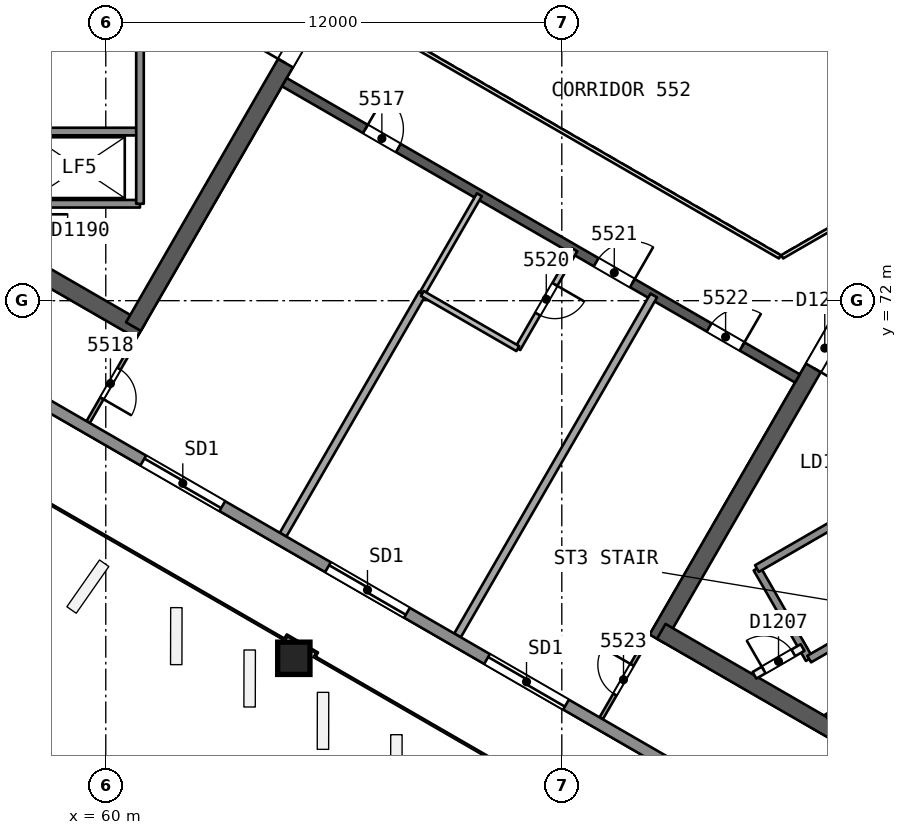
"""IFC4 building model, lengths in metres.
Left out: names, types, materials, properties, quantities, classifications, styles, units other than length and angle.
Written with IfcOpenShell. Run it as: python <this file> out.ifc"""

import sys

from ifc_helpers import new_model, si_unit, direction, frame, frame_2d, origin, origin_2d, place, context, subcontext, project, spatial, rectangle, extrude, element, fill, save


model = new_model("IFC4")
c1 = context("Model", 3, precision=1e-05, world=origin(), true_north=direction((0.0, 1.0)))
c2 = subcontext(c1, "Body", "Model", "MODEL_VIEW")
j1 = project(units=[si_unit("LENGTHUNIT", "METRE"), si_unit("PLANEANGLEUNIT", "RADIAN")], contexts=[c1])
p1 = place(None, origin())
s1 = spatial("IfcSite", under=j1, at=p1, CompositionType="ELEMENT")
p2 = place(p1, origin())
s2 = spatial("IfcBuilding", under=s1, at=p2, CompositionType="ELEMENT")
p3 = place(p2, frame((0.0, 0.0, 224.3)))
s3 = spatial("IfcBuildingStorey", under=s2, at=p3, CompositionType="ELEMENT", Elevation=224.3)
p4 = place(p3, frame((48.622, 78.307, 0.0), z_axis=(0.0, 0.0, 1.0), x_axis=(0.86602701116, -0.499997215934, 0.0)))
e1 = element("IfcWall", 1, at=p4, inside=s3, PredefinedType="SHEAR", context=c2, shape_type="SweptSolid", body=[
    extrude(rectangle(XDim=14.204, YDim=0.45, at=frame_2d((7.102, 0.0))), origin(), (0.0, 0.0, 1.0), 3.7),
])
p5 = place(p3, frame((60.728, 71.318, 0.0), z_axis=(0.0, 0.0, 1.0), x_axis=(0.500012416173, 0.866018235185, 0.0)))
e2 = element("IfcWall", 2, at=p5, inside=s3, PredefinedType="SHEAR", context=c2, shape_type="SweptSolid", body=[
    extrude(rectangle(XDim=10.155, YDim=0.45, at=frame_2d((5.078, 0.0))), origin(), (0.0, 0.0, 1.0), 3.7),
])
p6 = place(p5, frame((8.005, 0.0, 0.0)))
e3 = element("IfcOpeningElement", 3, at=p6, cuts=e2, PredefinedType="OPENING", context=c2, shape_type="SweptSolid", body=[
    extrude(rectangle(XDim=1.2, YDim=2.1, at=frame_2d((0.6, 1.05))), frame((0.0, 0.235, 0.0), z_axis=(0.0, -1.0, 0.0), x_axis=(1.0, 0.0, 0.0)), (0.0, 0.0, 1.0), 0.471),
])
p7 = place(p3, frame((79.63, 71.981, 0.0), z_axis=(0.0, 0.0, 1.0), x_axis=(-0.500002171595, -0.86602415001, 0.0)))
e4 = element("IfcWall", 4, at=p7, inside=s3, PredefinedType="SHEAR", context=c2, shape_type="SweptSolid", body=[
    extrude(rectangle(XDim=10.25, YDim=0.45, at=frame_2d((5.125, 0.0))), origin(), (0.0, 0.0, 1.0), 3.7),
])
p8 = place(p7, frame((0.82, 0.0, 0.0)))
e5 = element("IfcOpeningElement", 5, at=p8, cuts=e4, PredefinedType="OPENING", context=c2, shape_type="SweptSolid", body=[
    extrude(rectangle(XDim=1.2, YDim=2.1, at=frame_2d((0.6, 1.05))), frame((0.0, 0.235, 0.0), z_axis=(0.0, -1.0, 0.0), x_axis=(1.0, 0.0, 0.0)), (0.0, 0.0, 1.0), 0.471),
])
p9 = place(p3, frame((74.617, 63.299, 0.0), z_axis=(0.0, 0.0, 1.0), x_axis=(0.86602594008, -0.499999071108, 0.0)))
e6 = element("IfcWall", 6, at=p9, inside=s3, PredefinedType="SHEAR", context=c2, shape_type="SweptSolid", body=[
    extrude(rectangle(XDim=14.108, YDim=0.45, at=frame_2d((7.054, 0.0))), origin(), (0.0, 0.0, 1.0), 3.7),
])
p10 = place(p3, frame((64.7, 77.748, 0.0), z_axis=(0.0, 0.0, 1.0), x_axis=(0.866026492143, -0.499998114903, 0.0)))
e7 = element("IfcWall", 7, at=p10, inside=s3, PredefinedType="SHEAR", context=c2, shape_type="SweptSolid", body=[
    extrude(rectangle(XDim=15.588, YDim=0.25, at=frame_2d((7.794, 0.0))), origin(), (0.0, 0.0, 1.0), 3.3),
])
p11 = place(p10, frame((2.462, 0.0, 0.0)))
e8 = element("IfcOpeningElement", 8, at=p11, cuts=e7, PredefinedType="OPENING", context=c2, shape_type="SweptSolid", body=[
    extrude(rectangle(XDim=1.0, YDim=2.1, at=frame_2d((0.5, 1.05))), frame((0.0, 0.135, 0.0), z_axis=(0.0, -1.0, 0.0), x_axis=(1.0, 0.0, 0.0)), (0.0, 0.0, 1.0), 0.271),
])
p12 = place(p10, frame((9.474, 0.0, 0.0)))
e9 = element("IfcOpeningElement", 9, at=p12, cuts=e7, PredefinedType="OPENING", context=c2, shape_type="SweptSolid", body=[
    extrude(rectangle(XDim=1.1, YDim=2.1, at=frame_2d((0.55, 1.05))), frame((0.0, 0.135, 0.0), z_axis=(0.0, -1.0, 0.0), x_axis=(1.0, 0.0, 0.0)), (0.0, 0.0, 1.0), 0.271),
])
p13 = place(p10, frame((12.906, 0.0, 0.0)))
e10 = element("IfcOpeningElement", 10, at=p13, cuts=e7, PredefinedType="OPENING", context=c2, shape_type="SweptSolid", body=[
    extrude(rectangle(XDim=1.0, YDim=2.1, at=frame_2d((0.5, 1.05))), frame((0.0, 0.135, 0.0), z_axis=(0.0, -1.0, 0.0), x_axis=(1.0, 0.0, 0.0)), (0.0, 0.0, 1.0), 0.271),
])
p14 = place(p3, frame((64.936, 62.569, 0.0), z_axis=(0.010093620709, 0.017482414954, 0.999796221231), x_axis=(-0.499912926478, -0.865840372083, 0.020187025823)))
e11 = element("IfcColumn", 11, at=p14, inside=s3, PredefinedType="COLUMN", context=c2, shape_type="SweptSolid", body=[
    extrude(rectangle(XDim=0.85, YDim=0.85, at=origin_2d()), origin(), (0.0, 0.0, 1.0), 3.701),
])
p15 = place(p3, frame((60.71, 70.838, 0.0), z_axis=(0.0, 0.0, 1.0), x_axis=(-0.499950341091, -0.86605407247, 0.0)))
e12 = element("IfcWall", 12, at=p15, inside=s3, PredefinedType="PARTITIONING", context=c2, shape_type="SweptSolid", body=[
    extrude(rectangle(XDim=2.349, YDim=0.1, at=frame_2d((1.175, 0.0))), origin(), (0.0, 0.0, 1.0), 3.3),
])
p16 = place(p15, frame((0.725, 0.0, 0.0)))
e13 = element("IfcOpeningElement", 13, at=p16, cuts=e12, PredefinedType="OPENING", context=c2, shape_type="SweptSolid", body=[
    extrude(rectangle(XDim=0.9, YDim=2.1, at=frame_2d((0.45, 1.05))), frame((0.0, 0.061, 0.0), z_axis=(0.0, -1.0, 0.0), x_axis=(1.0, 0.0, 0.0)), (0.0, 0.0, 1.0), 0.121),
])
p17 = place(p3, frame((64.666, 65.842, 0.0), z_axis=(0.0, 0.0, 1.0), x_axis=(0.500019482754, 0.866014155119, 0.0)))
e14 = element("IfcWall", 14, at=p17, inside=s3, PredefinedType="PARTITIONING", context=c2, shape_type="SweptSolid", body=[
    extrude(rectangle(XDim=7.328, YDim=0.2, at=frame_2d((3.664, 0.0))), origin(), (0.0, 0.0, 1.0), 3.3),
])
p18 = place(p3, frame((68.33, 72.188, 0.0), z_axis=(0.0, 0.0, 1.0), x_axis=(0.499990139034, 0.866031096941, 0.0)))
e15 = element("IfcWall", 15, at=p18, inside=s3, PredefinedType="PARTITIONING", context=c2, shape_type="SweptSolid", body=[
    extrude(rectangle(XDim=3.0, YDim=0.15, at=frame_2d((1.5, 0.0))), origin(), (0.0, 0.0, 1.0), 3.3),
])
p19 = place(p3, frame((72.342, 73.336, 0.0), z_axis=(0.0, 0.0, 1.0), x_axis=(-0.50002537861, -0.866010750942, 0.0)))
e16 = element("IfcWall", 16, at=p19, inside=s3, PredefinedType="PARTITIONING", context=c2, shape_type="SweptSolid", body=[
    extrude(rectangle(XDim=3.0, YDim=0.15, at=frame_2d((1.5, 0.0))), origin(), (0.0, 0.0, 1.0), 3.3),
])
p20 = place(p19, frame((1.05, 0.0, 0.0)))
e17 = element("IfcOpeningElement", 17, at=p20, cuts=e16, PredefinedType="OPENING", context=c2, shape_type="SweptSolid", body=[
    extrude(rectangle(XDim=0.9, YDim=2.1, at=frame_2d((0.45, 1.05))), frame((0.0, 0.085, 0.0), z_axis=(0.0, -1.0, 0.0), x_axis=(1.0, 0.0, 0.0)), (0.0, 0.0, 1.0), 0.171),
])
p21 = place(p3, frame((70.842, 70.739, 0.0), z_axis=(0.0, 0.0, 1.0), x_axis=(-0.866032775405, 0.499987231761, 0.0)))
e18 = element("IfcWall", 18, at=p21, inside=s3, PredefinedType="PARTITIONING", context=c2, shape_type="SweptSolid", body=[
    extrude(rectangle(XDim=2.9, YDim=0.15, at=frame_2d((1.45, 0.0))), origin(), (0.0, 0.0, 1.0), 3.3),
])
p22 = place(p3, frame((69.256, 63.192, 0.0), z_axis=(0.0, 0.0, 1.0), x_axis=(0.499993230995, 0.866029311836, 0.0)))
e19 = element("IfcWall", 19, at=p22, inside=s3, PredefinedType="PARTITIONING", context=c2, shape_type="SweptSolid", body=[
    extrude(rectangle(XDim=10.328, YDim=0.2, at=frame_2d((5.164, 0.0))), origin(), (0.0, 0.0, 1.0), 3.3),
])
p23 = place(p3, frame((73.036, 61.01, 0.0), z_axis=(0.0, 0.0, 1.0), x_axis=(0.499950341091, 0.86605407247, 0.0)))
e20 = element("IfcWall", 20, at=p23, inside=s3, PredefinedType="PARTITIONING", context=c2, shape_type="SweptSolid", body=[
    extrude(rectangle(XDim=2.349, YDim=0.1, at=frame_2d((1.175, 0.0))), origin(), (0.0, 0.0, 1.0), 3.3),
])
p24 = place(p23, frame((0.725, 0.0, 0.0)))
e21 = element("IfcOpeningElement", 21, at=p24, cuts=e20, PredefinedType="OPENING", context=c2, shape_type="SweptSolid", body=[
    extrude(rectangle(XDim=0.9, YDim=2.1, at=frame_2d((0.45, 1.05))), frame((0.0, 0.061, 0.0), z_axis=(0.0, -1.0, 0.0), x_axis=(1.0, 0.0, 0.0)), (0.0, 0.0, 1.0), 0.121),
])
p25 = place(p3, frame((88.099, 52.141, 0.0), z_axis=(0.0, 0.0, 1.0), x_axis=(-0.86602584856, 0.499999229625, 0.0)))
e22 = element("IfcWall", 22, at=p25, inside=s3, PredefinedType="SOLIDWALL", context=c2, shape_type="SweptSolid", body=[
    extrude(rectangle(XDim=50.547, YDim=0.3, at=frame_2d((25.274, 0.0))), origin(), (0.0, 0.0, 1.0), 3.3),
])
p26 = place(p25, frame((23.294, 0.0, 0.0)))
e23 = element("IfcOpeningElement", 23, at=p26, cuts=e22, PredefinedType="OPENING", context=c2, shape_type="SweptSolid", body=[
    extrude(rectangle(XDim=2.4, YDim=2.4, at=frame_2d((1.2, 1.2))), frame((0.0, 0.161, 0.0), z_axis=(0.0, -1.0, 0.0), x_axis=(1.0, 0.0, 0.0)), (0.0, 0.0, 1.0), 0.321),
])
p27 = place(p25, frame((28.906, 0.0, 0.0)))
e24 = element("IfcOpeningElement", 24, at=p27, cuts=e22, PredefinedType="OPENING", context=c2, shape_type="SweptSolid", body=[
    extrude(rectangle(XDim=2.4, YDim=2.4, at=frame_2d((1.2, 1.2))), frame((0.0, 0.161, 0.0), z_axis=(0.0, -1.0, 0.0), x_axis=(1.0, 0.0, 0.0)), (0.0, 0.0, 1.0), 0.321),
])
p28 = place(p25, frame((39.328, 0.0, 0.0)))
e25 = element("IfcOpeningElement", 25, at=p28, cuts=e22, PredefinedType="OPENING", context=c2, shape_type="SweptSolid", body=[
    extrude(rectangle(XDim=2.4, YDim=2.4, at=frame_2d((1.2, 1.2))), frame((0.0, 0.161, 0.0), z_axis=(0.0, -1.0, 0.0), x_axis=(1.0, 0.0, 0.0)), (0.0, 0.0, 1.0), 0.321),
])
p29 = place(p25, frame((18.462, 0.0, 0.0)))
e26 = element("IfcOpeningElement", 26, at=p29, cuts=e22, PredefinedType="OPENING", context=c2, shape_type="SweptSolid", body=[
    extrude(rectangle(XDim=2.4, YDim=2.4, at=frame_2d((1.2, 1.2))), frame((0.0, 0.161, 0.0), z_axis=(0.0, -1.0, 0.0), x_axis=(1.0, 0.0, 0.0)), (0.0, 0.0, 1.0), 0.321),
])
p30 = place(p25, frame((8.771, 0.0, 0.0)))
e27 = element("IfcOpeningElement", 27, at=p30, cuts=e22, PredefinedType="OPENING", context=c2, shape_type="SweptSolid", body=[
    extrude(rectangle(XDim=2.4, YDim=2.4, at=frame_2d((1.2, 1.2))), frame((0.0, 0.161, 0.0), z_axis=(0.0, -1.0, 0.0), x_axis=(1.0, 0.0, 0.0)), (0.0, 0.0, 1.0), 0.321),
])
for number, where, z_axis, x_axis in (
    (28, (60.9, 76.45, 0.0), (0.0, 0.0, 1.0), (-1.0, 0.0, 0.0)),
    (29, (60.9, 74.55, 0.0), (0.0, 0.0, 1.0), (-1.0, 0.0, 0.0)),
):
    element("IfcWall", number, at=place(p3, frame(where, z_axis=z_axis, x_axis=x_axis)), inside=s3, PredefinedType="SOLIDWALL", context=c2, shape_type="SweptSolid", body=[
        extrude(rectangle(XDim=3.05, YDim=0.2, at=frame_2d((1.525, 0.0))), origin(), (0.0, 0.0, 1.0), 3.3),
    ])
p31 = place(p3, frame((60.9, 85.45, 0.0), z_axis=(0.0, 0.0, 1.0), x_axis=(0.0, -1.0, 0.0)))
e30 = element("IfcWall", 30, at=p31, inside=s3, PredefinedType="SOLIDWALL", context=c2, shape_type="SweptSolid", body=[
    extrude(rectangle(XDim=10.9, YDim=0.2, at=frame_2d((5.45, 0.0))), origin(), (0.0, 0.0, 1.0), 3.3),
])
p32 = place(p31, frame((4.0, 0.0, 0.0)))
e31 = element("IfcOpeningElement", 31, at=p32, cuts=e30, PredefinedType="OPENING", context=c2, shape_type="SweptSolid", body=[
    extrude(rectangle(XDim=1.0, YDim=2.1, at=frame_2d((0.5, 1.05))), frame((0.0, 0.11, 0.0), z_axis=(0.0, -1.0, 0.0), x_axis=(1.0, 0.0, 0.0)), (0.0, 0.0, 1.0), 0.221),
])
p33 = place(p3, frame((77.135, 64.952, 0.0), z_axis=(0.0, 0.0, 1.0), x_axis=(0.499996545922, -0.866027397988, 0.0)))
e32 = element("IfcWall", 32, at=p33, inside=s3, PredefinedType="SOLIDWALL", context=c2, shape_type="SweptSolid", body=[
    extrude(rectangle(XDim=2.75, YDim=0.2, at=frame_2d((1.375, 0.0))), origin(), (0.0, 0.0, 1.0), 3.3),
])
p34 = place(p3, frame((77.135, 64.952, 0.0), z_axis=(0.0, 0.0, 1.0), x_axis=(0.866031916153, 0.499988720078, 0.0)))
e33 = element("IfcWall", 33, at=p34, inside=s3, PredefinedType="SOLIDWALL", context=c2, shape_type="SweptSolid", body=[
    extrude(rectangle(XDim=11.35, YDim=0.2, at=frame_2d((5.675, 0.0))), origin(), (0.0, 0.0, 1.0), 3.3),
])
p35 = place(p34, frame((2.875, 0.0, 0.0)))
e34 = element("IfcOpeningElement", 34, at=p35, cuts=e33, PredefinedType="OPENING", context=c2, shape_type="SweptSolid", body=[
    extrude(rectangle(XDim=1.1, YDim=2.1, at=frame_2d((0.55, 1.05))), frame((0.0, 0.11, 0.0), z_axis=(0.0, -1.0, 0.0), x_axis=(1.0, 0.0, 0.0)), (0.0, 0.0, 1.0), 0.221),
])
p36 = place(p34, frame((5.125, 0.0, 0.0)))
e35 = element("IfcOpeningElement", 35, at=p36, cuts=e33, PredefinedType="OPENING", context=c2, shape_type="SweptSolid", body=[
    extrude(rectangle(XDim=1.1, YDim=2.1, at=frame_2d((0.55, 1.05))), frame((0.0, 0.11, 0.0), z_axis=(0.0, -1.0, 0.0), x_axis=(1.0, 0.0, 0.0)), (0.0, 0.0, 1.0), 0.221),
])
p37 = place(p34, frame((7.375, 0.0, 0.0)))
e36 = element("IfcOpeningElement", 36, at=p37, cuts=e33, PredefinedType="OPENING", context=c2, shape_type="SweptSolid", body=[
    extrude(rectangle(XDim=1.1, YDim=2.1, at=frame_2d((0.55, 1.05))), frame((0.0, 0.11, 0.0), z_axis=(0.0, -1.0, 0.0), x_axis=(1.0, 0.0, 0.0)), (0.0, 0.0, 1.0), 0.221),
])
p38 = place(p3, frame((77.07, 62.143, 0.0), z_axis=(0.0, 0.0, 1.0), x_axis=(0.866013036001, 0.500021421018, 0.0)))
e37 = element("IfcWall", 37, at=p38, inside=s3, PredefinedType="PARTITIONING", context=c2, shape_type="SweptSolid", body=[
    extrude(rectangle(XDim=1.461, YDim=0.2, at=frame_2d((0.73, 0.0))), origin(), (0.0, 0.0, 1.0), 3.3),
])
p39 = place(p38, frame((0.281, 0.0, 0.0)))
e38 = element("IfcOpeningElement", 38, at=p39, cuts=e37, PredefinedType="OPENING", context=c2, shape_type="SweptSolid", body=[
    extrude(rectangle(XDim=0.9, YDim=2.1, at=frame_2d((0.45, 1.05))), frame((0.0, 0.11, 0.0), z_axis=(0.0, -1.0, 0.0), x_axis=(1.0, 0.0, 0.0)), (0.0, 0.0, 1.0), 0.221),
])
p40 = place(p3, frame((78.51, 62.57, 0.0), z_axis=(0.0, 0.0, 1.0), x_axis=(0.866053019151, 0.499952165731, 0.0)))
e39 = element("IfcWall", 39, at=p40, inside=s3, PredefinedType="SOLIDWALL", context=c2, shape_type="SweptSolid", body=[
    extrude(rectangle(XDim=2.3, YDim=0.2, at=frame_2d((1.15, 0.0))), origin(), (0.0, 0.0, 1.0), 3.3),
])
p41 = place(p3, frame((78.97, 61.046, 0.0), z_axis=(0.0, 0.0, 1.0), x_axis=(0.866033475577, 0.499986018985, 0.0)))
e40 = element("IfcWall", 40, at=p41, inside=s3, PredefinedType="PARTITIONING", context=c2, shape_type="SweptSolid", body=[
    extrude(rectangle(XDim=2.539, YDim=0.15, at=frame_2d((1.27, 0.0))), origin(), (0.0, 0.0, 1.0), 3.3),
])
p42 = place(p3, frame((67.702, 78.948, 0.0), z_axis=(0.0, 0.0, 1.0), x_axis=(0.866026658274, -0.499997827154, 0.0)))
e41 = element("IfcWall", 41, at=p42, inside=s3, PredefinedType="PARTITIONING", context=c2, shape_type="SweptSolid", body=[
    extrude(rectangle(XDim=11.588, YDim=0.1, at=frame_2d((5.794, 0.0))), origin(), (0.0, 0.0, 1.0), 3.3),
])
p43 = place(p3, frame((77.798, 73.154, 0.0), z_axis=(0.0, 0.0, 1.0), x_axis=(0.866041268327, 0.499972520799, 0.0)))
e42 = element("IfcWall", 42, at=p43, inside=s3, PredefinedType="PARTITIONING", context=c2, shape_type="SweptSolid", body=[
    extrude(rectangle(XDim=2.0, YDim=0.1, at=frame_2d((1.0, 0.0))), origin(), (0.0, 0.0, 1.0), 3.3),
])
p44 = place(p11, origin())
e43 = element("IfcDoor", 43, at=p44, inside=s3, OperationType="SINGLE_SWING_LEFT", PredefinedType="NOTDEFINED", context=c2, shape_type="SweptSolid", body=[
    extrude(rectangle(XDim=1.0, YDim=2.1, at=frame_2d((0.5, 1.05))), frame((0.0, 0.025, 0.0), z_axis=(0.0, -1.0, 0.0), x_axis=(1.0, 0.0, 0.0)), (0.0, 0.0, 1.0), 0.05),
])
fill(e8, e43)
p45 = place(p16, origin())
e44 = element("IfcDoor", 44, at=p45, inside=s3, OperationType="SINGLE_SWING_RIGHT", PredefinedType="NOTDEFINED", context=c2, shape_type="SweptSolid", body=[
    extrude(rectangle(XDim=0.9, YDim=2.1, at=frame_2d((0.45, 1.05))), frame((0.0, 0.025, 0.0), z_axis=(0.0, -1.0, 0.0), x_axis=(1.0, 0.0, 0.0)), (0.0, 0.0, 1.0), 0.05),
])
fill(e13, e44)
p46 = place(p20, origin())
e45 = element("IfcDoor", 45, at=p46, inside=s3, OperationType="SINGLE_SWING_LEFT", PredefinedType="NOTDEFINED", context=c2, shape_type="SweptSolid", body=[
    extrude(rectangle(XDim=0.9, YDim=2.1, at=frame_2d((0.45, 1.05))), frame((0.0, 0.025, 0.0), z_axis=(0.0, -1.0, 0.0), x_axis=(1.0, 0.0, 0.0)), (0.0, 0.0, 1.0), 0.05),
])
fill(e17, e45)
p47 = place(p12, origin())
e46 = element("IfcDoor", 46, at=p47, inside=s3, OperationType="SINGLE_SWING_RIGHT", PredefinedType="NOTDEFINED", context=c2, shape_type="SweptSolid", body=[
    extrude(rectangle(XDim=1.1, YDim=2.1, at=frame_2d((0.55, 1.05))), frame((0.0, 0.025, 0.0), z_axis=(0.0, -1.0, 0.0), x_axis=(1.0, 0.0, 0.0)), (0.0, 0.0, 1.0), 0.05),
])
fill(e9, e46)
p48 = place(p13, origin())
e47 = element("IfcDoor", 47, at=p48, inside=s3, OperationType="SINGLE_SWING_RIGHT", PredefinedType="NOTDEFINED", context=c2, shape_type="SweptSolid", body=[
    extrude(rectangle(XDim=1.0, YDim=2.1, at=frame_2d((0.5, 1.05))), frame((0.0, 0.025, 0.0), z_axis=(0.0, -1.0, 0.0), x_axis=(1.0, 0.0, 0.0)), (0.0, 0.0, 1.0), 0.05),
])
fill(e10, e47)
p49 = place(p24, origin())
e48 = element("IfcDoor", 48, at=p49, inside=s3, OperationType="SINGLE_SWING_RIGHT", PredefinedType="NOTDEFINED", context=c2, shape_type="SweptSolid", body=[
    extrude(rectangle(XDim=0.9, YDim=2.1, at=frame_2d((0.45, 1.05))), frame((0.0, 0.025, 0.0), z_axis=(0.0, -1.0, 0.0), x_axis=(1.0, 0.0, 0.0)), (0.0, 0.0, 1.0), 0.05),
])
fill(e21, e48)
p50 = place(p26, origin())
e49 = element("IfcDoor", 49, at=p50, inside=s3, OperationType="SLIDING_TO_LEFT", PredefinedType="NOTDEFINED", context=c2, shape_type="SweptSolid", body=[
    extrude(rectangle(XDim=2.4, YDim=2.4, at=frame_2d((1.2, 1.2))), frame((0.0, 0.025, 0.0), z_axis=(0.0, -1.0, 0.0), x_axis=(1.0, 0.0, 0.0)), (0.0, 0.0, 1.0), 0.05),
])
fill(e23, e49)
p51 = place(p27, origin())
e50 = element("IfcDoor", 50, at=p51, inside=s3, OperationType="SLIDING_TO_RIGHT", PredefinedType="NOTDEFINED", context=c2, shape_type="SweptSolid", body=[
    extrude(rectangle(XDim=2.4, YDim=2.4, at=frame_2d((1.2, 1.2))), frame((0.0, 0.025, 0.0), z_axis=(0.0, -1.0, 0.0), x_axis=(1.0, 0.0, 0.0)), (0.0, 0.0, 1.0), 0.05),
])
fill(e24, e50)
p52 = place(p29, origin())
e51 = element("IfcDoor", 51, at=p52, inside=s3, OperationType="SLIDING_TO_RIGHT", PredefinedType="NOTDEFINED", context=c2, shape_type="SweptSolid", body=[
    extrude(rectangle(XDim=2.4, YDim=2.4, at=frame_2d((1.2, 1.2))), frame((0.0, 0.025, 0.0), z_axis=(0.0, -1.0, 0.0), x_axis=(1.0, 0.0, 0.0)), (0.0, 0.0, 1.0), 0.05),
])
fill(e26, e51)
p53 = place(p6, origin())
e52 = element("IfcDoor", 52, at=p53, inside=s3, OperationType="SINGLE_SWING_LEFT", PredefinedType="NOTDEFINED", context=c2, shape_type="SweptSolid", body=[
    extrude(rectangle(XDim=1.2, YDim=2.1, at=frame_2d((0.6, 1.05))), frame((0.0, 0.025, 0.0), z_axis=(0.0, -1.0, 0.0), x_axis=(1.0, 0.0, 0.0)), (0.0, 0.0, 1.0), 0.05),
])
fill(e3, e52)
p54 = place(p8, origin())
e53 = element("IfcDoor", 53, at=p54, inside=s3, OperationType="SINGLE_SWING_RIGHT", PredefinedType="NOTDEFINED", context=c2, shape_type="SweptSolid", body=[
    extrude(rectangle(XDim=1.2, YDim=2.1, at=frame_2d((0.6, 1.05))), frame((0.0, 0.025, 0.0), z_axis=(0.0, -1.0, 0.0), x_axis=(1.0, 0.0, 0.0)), (0.0, 0.0, 1.0), 0.05),
])
fill(e5, e53)
p55 = place(p39, origin())
e54 = element("IfcDoor", 54, at=p55, inside=s3, OperationType="SINGLE_SWING_LEFT", PredefinedType="NOTDEFINED", context=c2, shape_type="SweptSolid", body=[
    extrude(rectangle(XDim=0.9, YDim=2.1, at=frame_2d((0.45, 1.05))), frame((0.0, 0.025, 0.0), z_axis=(0.0, -1.0, 0.0), x_axis=(1.0, 0.0, 0.0)), (0.0, 0.0, 1.0), 0.05),
])
fill(e38, e54)
save(model, sys.argv[1])
